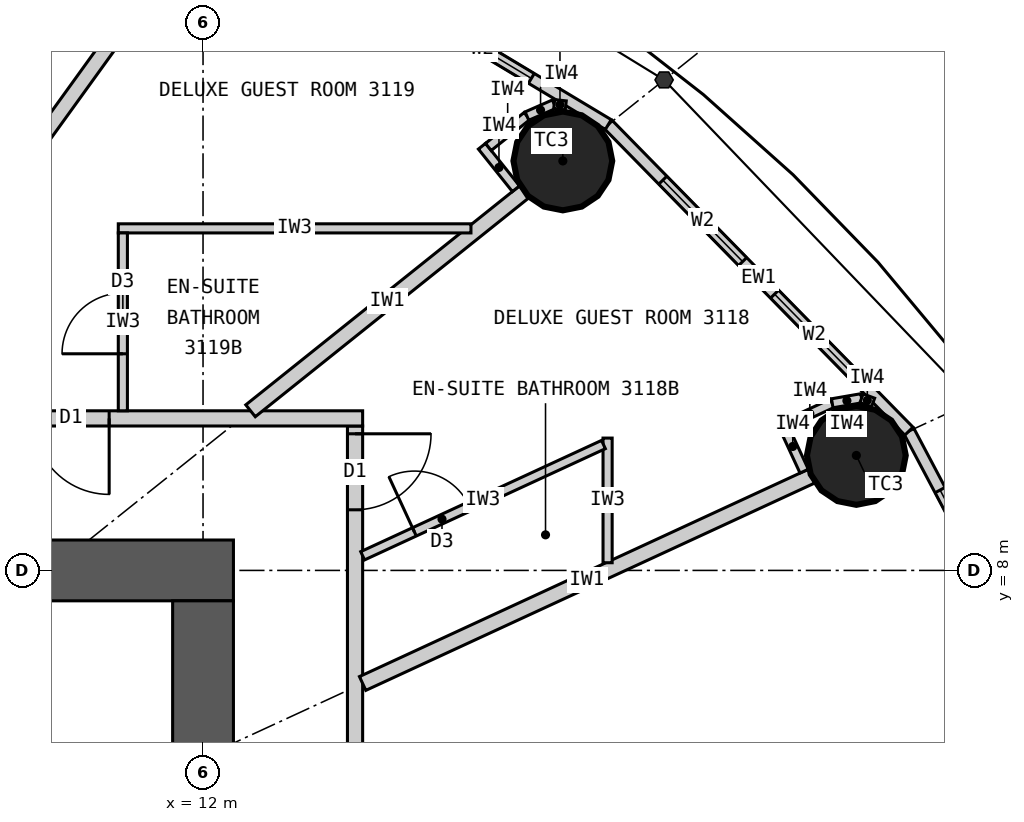
"""IFC4 building model, lengths in metres.
Left out: names, types, materials, properties, quantities, classifications, styles, units other than length and angle.
Written with IfcOpenShell. Run it as: python <this file> out.ifc"""

import sys

from ifc_helpers import new_model, si_unit, direction, frame, frame_2d, origin, origin_2d, place, context, subcontext, project, spatial, rectangle, circle, extrude, element, fill, save


model = new_model("IFC4")
c1 = context("Model", 3, precision=1e-05, world=origin(), true_north=direction((0.0, 1.0)))
c2 = subcontext(c1, "Body", "Model", "MODEL_VIEW")
j1 = project(units=[si_unit("LENGTHUNIT", "METRE"), si_unit("PLANEANGLEUNIT", "RADIAN")], contexts=[c1])
p1 = place(None, origin())
s1 = spatial("IfcSite", under=j1, at=p1, CompositionType="ELEMENT")
p2 = place(p1, origin())
s2 = spatial("IfcBuilding", under=s1, at=p2, CompositionType="ELEMENT")
p3 = place(p2, frame((0.0, 0.0, 122.1)))
s3 = spatial("IfcBuildingStorey", under=s2, at=p3, CompositionType="ELEMENT", Elevation=122.1)
for number, where, z_axis, x_axis in (
    (1, (20.596, 9.513, 0.0), (0.0, 0.0, 1.0), (1.0, 0.0, 0.0)),
    (2, (16.734, 13.387, 0.0), (0.0, 0.0, 1.0), (1.0, 0.0, 0.0)),
):
    element("IfcColumn", number, at=place(p3, frame(where, z_axis=z_axis, x_axis=x_axis)), inside=s3, PredefinedType="COLUMN", context=c2, shape_type="SweptSolid", body=[
        extrude(circle(Radius=0.65, at=origin_2d()), origin(), (0.0, 0.0, 1.0), 3.3),
    ])
p4 = place(p3, frame((-12.4, 8.0, 0.0), z_axis=(0.0, 0.0, 1.0), x_axis=(1.0, 0.0, 0.0)))
e3 = element("IfcWall", 3, at=p4, inside=s3, PredefinedType="SHEAR", context=c2, shape_type="SweptSolid", body=[
    extrude(rectangle(XDim=24.8, YDim=0.8, at=frame_2d((12.4, 0.0))), origin(), (0.0, 0.0, 1.0), 3.3),
])
p5 = place(p4, frame((11.1, 0.0, 0.0)))
e4 = element("IfcOpeningElement", 4, at=p5, cuts=e3, PredefinedType="OPENING", context=c2, shape_type="SweptSolid", body=[
    extrude(rectangle(XDim=1.2, YDim=2.2, at=frame_2d((0.6, 1.1))), frame((0.0, 0.41, 0.0), z_axis=(0.0, -1.0, 0.0), x_axis=(1.0, 0.0, 0.0)), (0.0, 0.0, 1.0), 0.82),
])
p6 = place(p4, frame((18.7, 0.0, 0.0)))
e5 = element("IfcOpeningElement", 5, at=p6, cuts=e3, PredefinedType="OPENING", context=c2, shape_type="SweptSolid", body=[
    extrude(rectangle(XDim=0.9, YDim=2.2, at=frame_2d((0.45, 1.1))), frame((0.0, 0.41, 0.0), z_axis=(0.0, -1.0, 0.0), x_axis=(1.0, 0.0, 0.0)), (0.0, 0.0, 1.0), 0.82),
])
p7 = place(p3, frame((12.0, -7.6, 0.0), z_axis=(0.0, 0.0, 1.0), x_axis=(0.0, 1.0, 0.0)))
e6 = element("IfcWall", 6, at=p7, inside=s3, PredefinedType="SHEAR", context=c2, shape_type="SweptSolid", body=[
    extrude(rectangle(XDim=15.2, YDim=0.8, at=frame_2d((7.6, 0.0))), origin(), (0.0, 0.0, 1.0), 3.3),
])
p8 = place(p7, frame((6.7, 0.0, 0.0)))
e7 = element("IfcOpeningElement", 7, at=p8, cuts=e6, PredefinedType="OPENING", context=c2, shape_type="SweptSolid", body=[
    extrude(rectangle(XDim=1.8, YDim=2.2, at=frame_2d((0.9, 1.1))), frame((0.0, 0.41, 0.0), z_axis=(0.0, -1.0, 0.0), x_axis=(1.0, 0.0, 0.0)), (0.0, 0.0, 1.0), 0.82),
])
p9 = place(p3, frame((23.792, 5.1, 0.0), z_axis=(0.0, 0.0, 1.0), x_axis=(-0.467814388454, 0.883826735257, 0.0)))
e8 = element("IfcWall", 8, at=p9, inside=s3, PredefinedType="ELEMENTEDWALL", context=c2, shape_type="SweptSolid", body=[
    extrude(rectangle(XDim=5.354, YDim=0.15, at=frame_2d((2.677, 0.0))), origin(), (0.0, 0.0, 1.0), 3.12),
])
p10 = place(p9, frame((0.877, 0.0, 0.9)))
e9 = element("IfcOpeningElement", 9, at=p10, cuts=e8, PredefinedType="OPENING", context=c2, shape_type="SweptSolid", body=[
    extrude(rectangle(XDim=1.5, YDim=1.9, at=frame_2d((0.75, 0.95))), frame((0.0, 0.085, 0.0), z_axis=(0.0, -1.0, 0.0), x_axis=(1.0, 0.0, 0.0)), (0.0, 0.0, 1.0), 0.17),
])
p11 = place(p9, frame((2.977, 0.0, 0.9)))
e10 = element("IfcOpeningElement", 10, at=p11, cuts=e8, PredefinedType="OPENING", context=c2, shape_type="SweptSolid", body=[
    extrude(rectangle(XDim=1.5, YDim=1.9, at=frame_2d((0.75, 0.95))), frame((0.0, 0.085, 0.0), z_axis=(0.0, -1.0, 0.0), x_axis=(1.0, 0.0, 0.0)), (0.0, 0.0, 1.0), 0.17),
])
p12 = place(p3, frame((21.287, 9.832, 0.0), z_axis=(0.0, 0.0, 1.0), x_axis=(-0.700136650834, 0.714008872605, 0.0)))
e11 = element("IfcWall", 11, at=p12, inside=s3, PredefinedType="ELEMENTEDWALL", context=c2, shape_type="SweptSolid", body=[
    extrude(rectangle(XDim=5.649, YDim=0.15, at=frame_2d((2.825, 0.0))), origin(), (0.0, 0.0, 1.0), 3.12),
])
p13 = place(p12, frame((1.025, 0.0, 0.9)))
e12 = element("IfcOpeningElement", 12, at=p13, cuts=e11, PredefinedType="OPENING", context=c2, shape_type="SweptSolid", body=[
    extrude(rectangle(XDim=1.5, YDim=1.9, at=frame_2d((0.75, 0.95))), frame((0.0, 0.085, 0.0), z_axis=(0.0, -1.0, 0.0), x_axis=(1.0, 0.0, 0.0)), (0.0, 0.0, 1.0), 0.17),
])
p14 = place(p12, frame((3.125, 0.0, 0.9)))
e13 = element("IfcOpeningElement", 13, at=p14, cuts=e11, PredefinedType="OPENING", context=c2, shape_type="SweptSolid", body=[
    extrude(rectangle(XDim=1.5, YDim=1.9, at=frame_2d((0.75, 0.95))), frame((0.0, 0.085, 0.0), z_axis=(0.0, -1.0, 0.0), x_axis=(1.0, 0.0, 0.0)), (0.0, 0.0, 1.0), 0.17),
])
p15 = place(p3, frame((17.332, 13.866, 0.0), z_axis=(0.0, 0.0, 1.0), x_axis=(-0.857308573723, 0.514802884044, 0.0)))
e14 = element("IfcWall", 14, at=p15, inside=s3, PredefinedType="ELEMENTEDWALL", context=c2, shape_type="SweptSolid", body=[
    extrude(rectangle(XDim=5.961, YDim=0.15, at=frame_2d((2.98, 0.0))), origin(), (0.0, 0.0, 1.0), 3.12),
])
p16 = place(p15, frame((1.181, 0.0, 0.9)))
e15 = element("IfcOpeningElement", 15, at=p16, cuts=e14, PredefinedType="OPENING", context=c2, shape_type="SweptSolid", body=[
    extrude(rectangle(XDim=1.5, YDim=1.9, at=frame_2d((0.75, 0.95))), frame((0.0, 0.085, 0.0), z_axis=(0.0, -1.0, 0.0), x_axis=(1.0, 0.0, 0.0)), (0.0, 0.0, 1.0), 0.17),
])
p17 = place(p15, frame((3.281, 0.0, 0.9)))
e16 = element("IfcOpeningElement", 16, at=p17, cuts=e14, PredefinedType="OPENING", context=c2, shape_type="SweptSolid", body=[
    extrude(rectangle(XDim=1.5, YDim=1.9, at=frame_2d((0.75, 0.95))), frame((0.0, 0.085, 0.0), z_axis=(0.0, -1.0, 0.0), x_axis=(1.0, 0.0, 0.0)), (0.0, 0.0, 1.0), 0.17),
])
p18 = place(p3, frame((14.0, -9.9, 0.0), z_axis=(0.0, 0.0, 1.0), x_axis=(0.0, 1.0, 0.0)))
e17 = element("IfcWall", 17, at=p18, inside=s3, PredefinedType="PARTITIONING", context=c2, shape_type="SweptSolid", body=[
    extrude(rectangle(XDim=19.8, YDim=0.2, at=frame_2d((9.9, 0.0))), origin(), (0.0, 0.0, 1.0), 3.12),
])
p19 = place(p18, frame((2.478, 0.0, 0.0)))
e18 = element("IfcOpeningElement", 18, at=p19, cuts=e17, PredefinedType="OPENING", context=c2, shape_type="SweptSolid", body=[
    extrude(rectangle(XDim=1.0, YDim=2.2, at=frame_2d((0.5, 1.1))), frame((0.0, 0.11, 0.0), z_axis=(0.0, -1.0, 0.0), x_axis=(1.0, 0.0, 0.0)), (0.0, 0.0, 1.0), 0.22),
])
p20 = place(p18, frame((8.838, 0.0, 0.0)))
e19 = element("IfcOpeningElement", 19, at=p20, cuts=e17, PredefinedType="OPENING", context=c2, shape_type="SweptSolid", body=[
    extrude(rectangle(XDim=1.0, YDim=2.2, at=frame_2d((0.5, 1.1))), frame((0.0, 0.11, 0.0), z_axis=(0.0, -1.0, 0.0), x_axis=(1.0, 0.0, 0.0)), (0.0, 0.0, 1.0), 0.22),
])
p21 = place(p18, frame((13.742, 0.0, 0.0)))
e20 = element("IfcOpeningElement", 20, at=p21, cuts=e17, PredefinedType="OPENING", context=c2, shape_type="SweptSolid", body=[
    extrude(rectangle(XDim=1.0, YDim=2.2, at=frame_2d((0.5, 1.1))), frame((0.0, 0.11, 0.0), z_axis=(0.0, -1.0, 0.0), x_axis=(1.0, 0.0, 0.0)), (0.0, 0.0, 1.0), 0.22),
])
p22 = place(p18, frame((18.698, 0.0, 0.0)))
e21 = element("IfcOpeningElement", 21, at=p22, cuts=e17, PredefinedType="OPENING", context=c2, shape_type="SweptSolid", body=[
    extrude(rectangle(XDim=1.0, YDim=2.2, at=frame_2d((0.5, 1.1))), frame((0.0, 0.11, 0.0), z_axis=(0.0, -1.0, 0.0), x_axis=(1.0, 0.0, 0.0)), (0.0, 0.0, 1.0), 0.22),
])
p23 = place(p3, frame((3.283, 10.0, 0.0), z_axis=(0.0, 0.0, 1.0), x_axis=(1.0, 0.0, 0.0)))
e22 = element("IfcWall", 22, at=p23, inside=s3, PredefinedType="PARTITIONING", context=c2, shape_type="SweptSolid", body=[
    extrude(rectangle(XDim=10.817, YDim=0.2, at=frame_2d((5.409, 0.0))), origin(), (0.0, 0.0, 1.0), 3.12),
])
p24 = place(p23, frame((6.482, 0.0, 0.0)))
e23 = element("IfcOpeningElement", 23, at=p24, cuts=e22, PredefinedType="OPENING", context=c2, shape_type="SweptSolid", body=[
    extrude(rectangle(XDim=1.0, YDim=2.2, at=frame_2d((0.5, 1.1))), frame((0.0, 0.11, 0.0), z_axis=(0.0, -1.0, 0.0), x_axis=(1.0, 0.0, 0.0)), (0.0, 0.0, 1.0), 0.22),
])
p25 = place(p3, frame((14.1, 6.512, 0.0), z_axis=(0.0, 0.0, 1.0), x_axis=(0.907833019998, 0.419331858797, 0.0)))
e24 = element("IfcWall", 24, at=p25, inside=s3, PredefinedType="PARTITIONING", context=c2, shape_type="SweptSolid", body=[
    extrude(rectangle(XDim=6.505, YDim=0.2, at=frame_2d((3.252, 0.0))), origin(), (0.0, 0.0, 1.0), 2.27),
])
p26 = place(p3, frame((12.625, 10.1, 0.0), z_axis=(0.0, 0.0, 1.0), x_axis=(0.780863644897, 0.624701503182, 0.0)))
e25 = element("IfcWall", 25, at=p26, inside=s3, PredefinedType="PARTITIONING", context=c2, shape_type="SweptSolid", body=[
    extrude(rectangle(XDim=4.612, YDim=0.2, at=frame_2d((2.306, 0.0))), origin(), (0.0, 0.0, 1.0), 2.37),
])
p27 = place(p3, frame((7.289, 10.1, 0.0), z_axis=(0.0, 0.0, 1.0), x_axis=(0.585217367024, 0.81087645997, 0.0)))
e26 = element("IfcWall", 26, at=p27, inside=s3, PredefinedType="PARTITIONING", context=c2, shape_type="SweptSolid", body=[
    extrude(rectangle(XDim=7.016, YDim=0.2, at=frame_2d((3.508, 0.0))), origin(), (0.0, 0.0, 1.0), 2.37),
])
p28 = place(p3, frame((17.323, 8.101, 0.0), z_axis=(0.0, 0.0, 1.0), x_axis=(0.0, 1.0, 0.0)))
e27 = element("IfcWall", 27, at=p28, inside=s3, PredefinedType="PARTITIONING", context=c2, shape_type="SweptSolid", body=[
    extrude(rectangle(XDim=1.64, YDim=0.12, at=frame_2d((0.82, 0.0))), origin(), (0.0, 0.0, 1.0), 3.12),
])
p29 = place(p3, frame((14.1, 8.193, 0.0), z_axis=(0.0, 0.0, 1.0), x_axis=(0.907836493557, 0.419324338628, 0.0)))
e28 = element("IfcWall", 28, at=p29, inside=s3, PredefinedType="PARTITIONING", context=c2, shape_type="SweptSolid", body=[
    extrude(rectangle(XDim=3.49, YDim=0.12, at=frame_2d((1.745, 0.0))), origin(), (0.0, 0.0, 1.0), 3.12),
])
p30 = place(p29, frame((0.75, 0.0, 0.0)))
e29 = element("IfcOpeningElement", 29, at=p30, cuts=e28, PredefinedType="OPENING", context=c2, shape_type="SweptSolid", body=[
    extrude(rectangle(XDim=0.8, YDim=2.1, at=frame_2d((0.4, 1.05))), frame((0.0, 0.07, 0.0), z_axis=(0.0, -1.0, 0.0), x_axis=(1.0, 0.0, 0.0)), (0.0, 0.0, 1.0), 0.14),
])
p31 = place(p3, frame((15.525, 12.5, 0.0), z_axis=(0.0, 0.0, 1.0), x_axis=(-1.0, 0.0, 0.0)))
e30 = element("IfcWall", 30, at=p31, inside=s3, PredefinedType="PARTITIONING", context=c2, shape_type="SweptSolid", body=[
    extrude(rectangle(XDim=4.64, YDim=0.12, at=frame_2d((2.32, 0.0))), origin(), (0.0, 0.0, 1.0), 3.12),
])
p32 = place(p3, frame((10.945, 10.1, 0.0), z_axis=(0.0, 0.0, 1.0), x_axis=(0.0, 1.0, 0.0)))
e31 = element("IfcWall", 31, at=p32, inside=s3, PredefinedType="PARTITIONING", context=c2, shape_type="SweptSolid", body=[
    extrude(rectangle(XDim=2.34, YDim=0.12, at=frame_2d((1.17, 0.0))), origin(), (0.0, 0.0, 1.0), 3.12),
])
p33 = place(p32, frame((0.75, 0.0, 0.0)))
e32 = element("IfcOpeningElement", 32, at=p33, cuts=e31, PredefinedType="OPENING", context=c2, shape_type="SweptSolid", body=[
    extrude(rectangle(XDim=0.8, YDim=2.1, at=frame_2d((0.4, 1.05))), frame((0.0, 0.07, 0.0), z_axis=(0.0, -1.0, 0.0), x_axis=(1.0, 0.0, 0.0)), (0.0, 0.0, 1.0), 0.14),
])
p34 = place(p3, frame((19.909, 9.306, 0.0), z_axis=(0.0, 0.0, 1.0), x_axis=(-0.419296148934, 0.90784951368, 0.0)))
e33 = element("IfcWall", 33, at=p34, inside=s3, PredefinedType="PARTITIONING", context=c2, shape_type="SweptSolid", body=[
    extrude(rectangle(XDim=0.716, YDim=0.12, at=frame_2d((0.358, 0.0))), origin(), (0.0, 0.0, 1.0), 3.12),
])
p35 = place(p3, frame((19.689, 9.926, 0.0), z_axis=(0.0, 0.0, 1.0), x_axis=(0.907893409272, 0.419201094227, 0.0)))
e34 = element("IfcWall", 34, at=p35, inside=s3, PredefinedType="PARTITIONING", context=c2, shape_type="SweptSolid", body=[
    extrude(rectangle(XDim=0.65, YDim=0.12, at=frame_2d((0.325, 0.0))), origin(), (0.0, 0.0, 1.0), 3.12),
])
p36 = place(p3, frame((20.279, 10.199, 0.0), z_axis=(0.0, 0.0, 1.0), x_axis=(0.985380740712, 0.170366651181, 0.0)))
e35 = element("IfcWall", 35, at=p36, inside=s3, PredefinedType="PARTITIONING", context=c2, shape_type="SweptSolid", body=[
    extrude(rectangle(XDim=0.391, YDim=0.12, at=frame_2d((0.196, 0.0))), origin(), (0.0, 0.0, 1.0), 3.12),
])
p37 = place(p3, frame((20.664, 10.265, 0.0), z_axis=(0.0, 0.0, 1.0), x_axis=(0.938058651481, -0.346476501918, 0.0)))
e36 = element("IfcWall", 36, at=p37, inside=s3, PredefinedType="PARTITIONING", context=c2, shape_type="SweptSolid", body=[
    extrude(rectangle(XDim=0.161, YDim=0.12, at=frame_2d((0.081, 0.0))), origin(), (0.0, 0.0, 1.0), 3.12),
])
p38 = place(p3, frame((16.117, 13.022, 0.0), z_axis=(0.0, 0.0, 1.0), x_axis=(-0.62465344249, 0.780902091677, 0.0)))
e37 = element("IfcWall", 37, at=p38, inside=s3, PredefinedType="PARTITIONING", context=c2, shape_type="SweptSolid", body=[
    extrude(rectangle(XDim=0.716, YDim=0.12, at=frame_2d((0.358, 0.0))), origin(), (0.0, 0.0, 1.0), 3.12),
])
p39 = place(p3, frame((15.754, 13.571, 0.0), z_axis=(0.0, 0.0, 1.0), x_axis=(0.780905453553, 0.624649239663, 0.0)))
e38 = element("IfcWall", 38, at=p39, inside=s3, PredefinedType="PARTITIONING", context=c2, shape_type="SweptSolid", body=[
    extrude(rectangle(XDim=0.65, YDim=0.12, at=frame_2d((0.325, 0.0))), origin(), (0.0, 0.0, 1.0), 3.12),
])
p40 = place(p3, frame((16.262, 13.977, 0.0), z_axis=(0.0, 0.0, 1.0), x_axis=(0.915985403703, 0.401211590314, 0.0)))
e39 = element("IfcWall", 39, at=p40, inside=s3, PredefinedType="PARTITIONING", context=c2, shape_type="SweptSolid", body=[
    extrude(rectangle(XDim=0.391, YDim=0.12, at=frame_2d((0.196, 0.0))), origin(), (0.0, 0.0, 1.0), 3.12),
])
p41 = place(p3, frame((16.62, 14.134, 0.0), z_axis=(0.0, 0.0, 1.0), x_axis=(0.993941871493, -0.109907033867, 0.0)))
e40 = element("IfcWall", 40, at=p41, inside=s3, PredefinedType="PARTITIONING", context=c2, shape_type="SweptSolid", body=[
    extrude(rectangle(XDim=0.153, YDim=0.12, at=frame_2d((0.077, 0.0))), origin(), (0.0, 0.0, 1.0), 3.12),
])
p42 = place(p11, origin())
e41 = element("IfcWindow", 41, at=p42, inside=s3, PartitioningType="SINGLE_PANEL", PredefinedType="WINDOW", context=c2, shape_type="SweptSolid", body=[
    extrude(rectangle(XDim=1.5, YDim=1.9, at=frame_2d((0.75, 0.95))), frame((0.0, 0.03, 0.0), z_axis=(0.0, -1.0, 0.0), x_axis=(1.0, 0.0, 0.0)), (0.0, 0.0, 1.0), 0.06),
])
fill(e10, e41)
p43 = place(p13, origin())
e42 = element("IfcWindow", 42, at=p43, inside=s3, PartitioningType="SINGLE_PANEL", PredefinedType="WINDOW", context=c2, shape_type="SweptSolid", body=[
    extrude(rectangle(XDim=1.5, YDim=1.9, at=frame_2d((0.75, 0.95))), frame((0.0, 0.03, 0.0), z_axis=(0.0, -1.0, 0.0), x_axis=(1.0, 0.0, 0.0)), (0.0, 0.0, 1.0), 0.06),
])
fill(e12, e42)
p44 = place(p14, origin())
e43 = element("IfcWindow", 43, at=p44, inside=s3, PartitioningType="SINGLE_PANEL", PredefinedType="WINDOW", context=c2, shape_type="SweptSolid", body=[
    extrude(rectangle(XDim=1.5, YDim=1.9, at=frame_2d((0.75, 0.95))), frame((0.0, 0.03, 0.0), z_axis=(0.0, -1.0, 0.0), x_axis=(1.0, 0.0, 0.0)), (0.0, 0.0, 1.0), 0.06),
])
fill(e13, e43)
p45 = place(p16, origin())
e44 = element("IfcWindow", 44, at=p45, inside=s3, PartitioningType="SINGLE_PANEL", PredefinedType="WINDOW", context=c2, shape_type="SweptSolid", body=[
    extrude(rectangle(XDim=1.5, YDim=1.9, at=frame_2d((0.75, 0.95))), frame((0.0, 0.03, 0.0), z_axis=(0.0, -1.0, 0.0), x_axis=(1.0, 0.0, 0.0)), (0.0, 0.0, 1.0), 0.06),
])
fill(e15, e44)
p46 = place(p30, origin())
e45 = element("IfcDoor", 45, at=p46, inside=s3, OperationType="SINGLE_SWING_LEFT", PredefinedType="DOOR", context=c2, shape_type="SweptSolid", body=[
    extrude(rectangle(XDim=0.8, YDim=2.1, at=frame_2d((0.4, 1.05))), frame((0.0, 0.025, 0.0), z_axis=(0.0, -1.0, 0.0), x_axis=(1.0, 0.0, 0.0)), (0.0, 0.0, 1.0), 0.05),
])
fill(e29, e45)
p47 = place(p22, origin())
e46 = element("IfcDoor", 46, at=p47, inside=s3, OperationType="SINGLE_SWING_RIGHT", PredefinedType="DOOR", context=c2, shape_type="SweptSolid", body=[
    extrude(rectangle(XDim=1.0, YDim=2.2, at=frame_2d((0.5, 1.1))), frame((0.0, 0.025, 0.0), z_axis=(0.0, -1.0, 0.0), x_axis=(1.0, 0.0, 0.0)), (0.0, 0.0, 1.0), 0.05),
])
fill(e21, e46)
p48 = place(p33, origin())
e47 = element("IfcDoor", 47, at=p48, inside=s3, OperationType="SINGLE_SWING_LEFT", PredefinedType="DOOR", context=c2, shape_type="SweptSolid", body=[
    extrude(rectangle(XDim=0.8, YDim=2.1, at=frame_2d((0.4, 1.05))), frame((0.0, 0.025, 0.0), z_axis=(0.0, -1.0, 0.0), x_axis=(1.0, 0.0, 0.0)), (0.0, 0.0, 1.0), 0.05),
])
fill(e32, e47)
p49 = place(p24, origin())
e48 = element("IfcDoor", 48, at=p49, inside=s3, OperationType="SINGLE_SWING_RIGHT", PredefinedType="DOOR", context=c2, shape_type="SweptSolid", body=[
    extrude(rectangle(XDim=1.0, YDim=2.2, at=frame_2d((0.5, 1.1))), frame((0.0, 0.025, 0.0), z_axis=(0.0, -1.0, 0.0), x_axis=(1.0, 0.0, 0.0)), (0.0, 0.0, 1.0), 0.05),
])
fill(e23, e48)
save(model, sys.argv[1])
